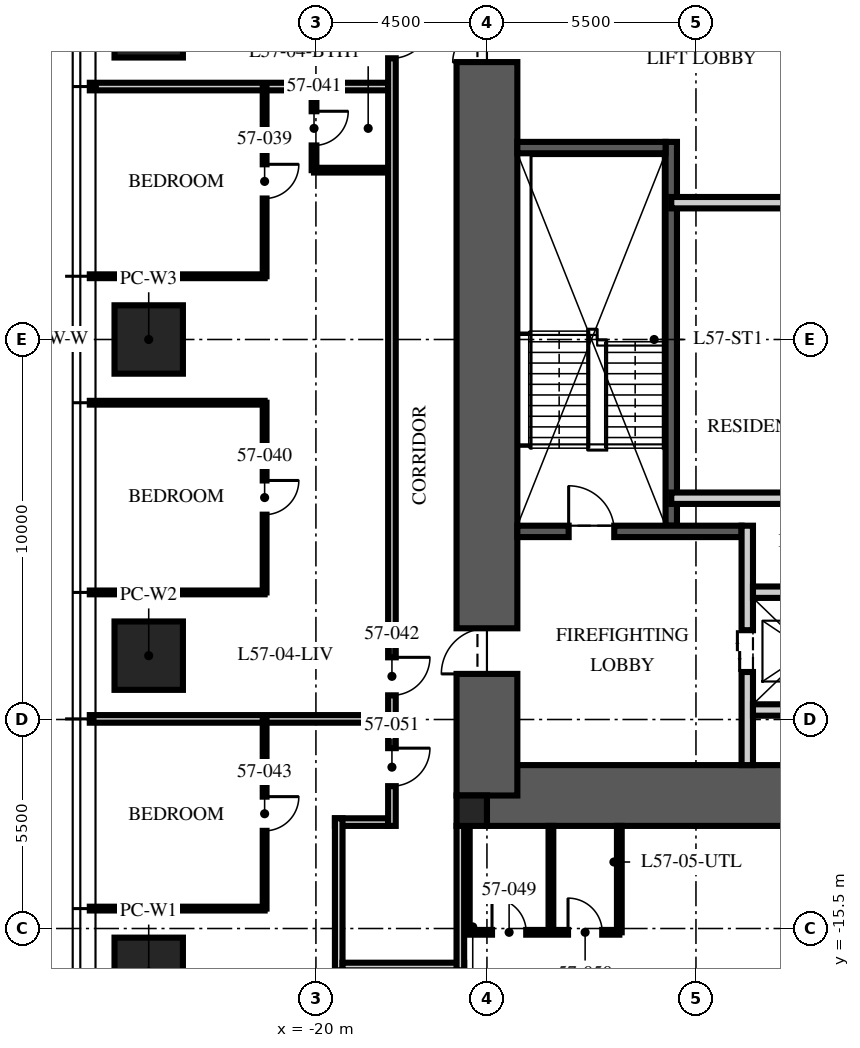
"""IFC4 building model, lengths in metres.
Left out: names, types, materials, properties, quantities, classifications, styles, units other than length and angle.
Written with IfcOpenShell. Run it as: python <this file> out.ifc"""

import sys

from ifc_helpers import new_model, si_unit, direction, frame, frame_2d, origin, origin_2d, place, context, subcontext, project, spatial, rectangle, extrude, element, fill, save


model = new_model("IFC4")
c1 = context("Model", 3, precision=1e-05, world=origin(), true_north=direction((0.0, 1.0)))
c2 = subcontext(c1, "Body", "Model", "MODEL_VIEW")
j1 = project(units=[si_unit("LENGTHUNIT", "METRE"), si_unit("PLANEANGLEUNIT", "RADIAN")], contexts=[c1])
p1 = place(None, origin())
s1 = spatial("IfcSite", under=j1, at=p1, CompositionType="ELEMENT")
p2 = place(p1, origin())
s2 = spatial("IfcBuilding", under=s1, at=p2, CompositionType="ELEMENT")
p3 = place(p2, frame((0.0, 0.0, 229.5)))
s3 = spatial("IfcBuildingStorey", under=s2, at=p3, CompositionType="ELEMENT", Elevation=229.5)
p4 = place(p3, frame((-15.5, -12.0, -0.25), z_axis=(0.0, 0.0, 1.0), x_axis=(1.0, 0.0, 0.0)))
e1 = element("IfcWall", 1, at=p4, inside=s3, PredefinedType="SHEAR", context=c2, shape_type="SweptSolid", body=[
    extrude(rectangle(XDim=31.0, YDim=1.6, at=frame_2d((15.5, 0.0))), origin(), (0.0, 0.0, 1.0), 3.75),
])
p5 = place(p3, frame((-15.5, -12.0, -0.25), z_axis=(0.0, 0.0, 1.0), x_axis=(0.0, 1.0, 0.0)))
e2 = element("IfcWall", 2, at=p5, inside=s3, PredefinedType="SHEAR", context=c2, shape_type="SweptSolid", body=[
    extrude(rectangle(XDim=24.0, YDim=1.6, at=frame_2d((12.0, 0.0))), origin(), (0.0, 0.0, 1.0), 3.75),
])
p6 = place(p5, frame((3.2, 0.0, 0.25)))
e3 = element("IfcOpeningElement", 3, at=p6, cuts=e2, PredefinedType="OPENING", context=c2, shape_type="SweptSolid", body=[
    extrude(rectangle(XDim=1.2, YDim=2.1, at=frame_2d((0.6, 1.05))), frame((0.0, 0.81, 0.0), z_axis=(0.0, -1.0, 0.0), x_axis=(1.0, 0.0, 0.0)), (0.0, 0.0, 1.0), 1.62),
])
p7 = place(p5, frame((19.3, 0.0, 0.25)))
e4 = element("IfcOpeningElement", 4, at=p7, cuts=e2, PredefinedType="OPENING", context=c2, shape_type="SweptSolid", body=[
    extrude(rectangle(XDim=1.8, YDim=2.1, at=frame_2d((0.9, 1.05))), frame((0.0, 0.81, 0.0), z_axis=(0.0, -1.0, 0.0), x_axis=(1.0, 0.0, 0.0)), (0.0, 0.0, 1.0), 1.62),
])
p8 = place(p3, frame((-15.9, -12.4, -0.25), z_axis=(0.0, 0.0, 1.0), x_axis=(1.0, 0.0, 0.0)))
e5 = element("IfcColumn", 5, at=p8, inside=s3, PredefinedType="COLUMN", context=c2, shape_type="SweptSolid", body=[
    extrude(rectangle(XDim=0.8, YDim=0.8, at=origin_2d()), origin(), (0.0, 0.0, 1.0), 3.75),
])
for number, where, z_axis, x_axis in (
    (6, (-24.4, -16.64, 0.0), (0.0, 0.0, 1.0), (0.0, 1.0, 0.0)),
    (7, (-24.4, -8.32, 0.0), (0.0, 0.0, 1.0), (0.0, 1.0, 0.0)),
    (8, (-24.4, 0.0, 0.0), (0.0, 0.0, 1.0), (0.0, 1.0, 0.0)),
    (9, (-24.4, 8.32, 0.0), (0.0, 0.0, 1.0), (0.0, 1.0, 0.0)),
):
    element("IfcColumn", number, at=place(p3, frame(where, z_axis=z_axis, x_axis=x_axis)), inside=s3, PredefinedType="COLUMN", context=c2, shape_type="SweptSolid", body=[
        extrude(rectangle(XDim=1.8, YDim=1.8, at=origin_2d()), origin(), (0.0, 0.0, 1.0), 3.75),
    ])
p9 = place(p3, frame((-10.65, -4.9, 0.0), z_axis=(0.0, 0.0, 1.0), x_axis=(0.0, 1.0, 0.0)))
e10 = element("IfcWall", 10, at=p9, inside=s3, PredefinedType="SOLIDWALL", context=c2, shape_type="SweptSolid", body=[
    extrude(rectangle(XDim=10.1, YDim=0.3, at=frame_2d((5.05, 0.0))), origin(), (0.0, 0.0, 1.0), 3.5),
])
p10 = place(p3, frame((-14.7, -5.05, 0.0), z_axis=(0.0, 0.0, 1.0), x_axis=(1.0, 0.0, 0.0)))
e11 = element("IfcWall", 11, at=p10, inside=s3, PredefinedType="SOLIDWALL", context=c2, shape_type="SweptSolid", body=[
    extrude(rectangle(XDim=5.9, YDim=0.3, at=frame_2d((2.95, 0.0))), origin(), (0.0, 0.0, 1.0), 3.5),
])
p11 = place(p10, frame((1.35, 0.0, 0.0)))
e12 = element("IfcOpeningElement", 12, at=p11, cuts=e11, PredefinedType="OPENING", context=c2, shape_type="SweptSolid", body=[
    extrude(rectangle(XDim=1.2, YDim=2.1, at=frame_2d((0.6, 1.05))), frame((0.0, 0.16, 0.0), z_axis=(0.0, -1.0, 0.0), x_axis=(1.0, 0.0, 0.0)), (0.0, 0.0, 1.0), 0.32),
])
p12 = place(p3, frame((-14.7, 5.05, 0.0), z_axis=(0.0, 0.0, 1.0), x_axis=(1.0, 0.0, 0.0)))
e13 = element("IfcWall", 13, at=p12, inside=s3, PredefinedType="SOLIDWALL", context=c2, shape_type="SweptSolid", body=[
    extrude(rectangle(XDim=3.9, YDim=0.3, at=frame_2d((1.95, 0.0))), origin(), (0.0, 0.0, 1.0), 3.5),
])
p13 = place(p3, frame((-8.65, -11.2, 0.0), z_axis=(0.0, 0.0, 1.0), x_axis=(0.0, 1.0, 0.0)))
e14 = element("IfcWall", 14, at=p13, inside=s3, PredefinedType="PARTITIONING", context=c2, shape_type="SweptSolid", body=[
    extrude(rectangle(XDim=6.3, YDim=0.3, at=frame_2d((3.15, 0.0))), origin(), (0.0, 0.0, 1.0), 3.5),
])
p14 = place(p13, frame((2.45, 0.0, 0.0)))
e15 = element("IfcOpeningElement", 15, at=p14, cuts=e14, PredefinedType="OPENING", context=c2, shape_type="SweptSolid", body=[
    extrude(rectangle(XDim=1.1, YDim=2.1, at=frame_2d((0.55, 1.05))), frame((0.0, 0.16, 0.0), z_axis=(0.0, -1.0, 0.0), x_axis=(1.0, 0.0, 0.0)), (0.0, 0.0, 1.0), 0.32),
])
p15 = place(p3, frame((-8.5, -6.65, 0.0), z_axis=(0.0, 0.0, 1.0), x_axis=(1.0, 0.0, 0.0)))
e16 = element("IfcWall", 16, at=p15, inside=s3, PredefinedType="PARTITIONING", context=c2, shape_type="SweptSolid", body=[
    extrude(rectangle(XDim=17.0, YDim=0.3, at=frame_2d((8.5, 0.0))), origin(), (0.0, 0.0, 1.0), 3.5),
])
p16 = place(p15, frame((7.8, 0.0, 0.0)))
e17 = element("IfcOpeningElement", 17, at=p16, cuts=e16, PredefinedType="OPENING", context=c2, shape_type="SweptSolid", body=[
    extrude(rectangle(XDim=1.3, YDim=2.4, at=frame_2d((0.65, 1.2))), frame((0.0, 0.16, 0.0), z_axis=(0.0, -1.0, 0.0), x_axis=(1.0, 0.0, 0.0)), (0.0, 0.0, 1.0), 0.32),
])
p17 = place(p15, frame((5.65, 0.0, 0.0)))
e18 = element("IfcOpeningElement", 18, at=p17, cuts=e16, PredefinedType="OPENING", context=c2, shape_type="SweptSolid", body=[
    extrude(rectangle(XDim=0.9, YDim=2.1, at=frame_2d((0.45, 1.05))), frame((0.0, 0.16, 0.0), z_axis=(0.0, -1.0, 0.0), x_axis=(1.0, 0.0, 0.0)), (0.0, 0.0, 1.0), 0.32),
])
p18 = place(p15, frame((10.4, 0.0, 0.0)))
e19 = element("IfcOpeningElement", 19, at=p18, cuts=e16, PredefinedType="OPENING", context=c2, shape_type="SweptSolid", body=[
    extrude(rectangle(XDim=0.9, YDim=2.1, at=frame_2d((0.45, 1.05))), frame((0.0, 0.16, 0.0), z_axis=(0.0, -1.0, 0.0), x_axis=(1.0, 0.0, 0.0)), (0.0, 0.0, 1.0), 0.32),
])
p19 = place(p3, frame((-8.5, -9.75, 0.0), z_axis=(0.0, 0.0, 1.0), x_axis=(1.0, 0.0, 0.0)))
e20 = element("IfcWall", 20, at=p19, inside=s3, PredefinedType="PARTITIONING", context=c2, shape_type="SweptSolid", body=[
    extrude(rectangle(XDim=2.9, YDim=0.3, at=frame_2d((1.45, 0.0))), origin(), (0.0, 0.0, 1.0), 3.5),
])
p20 = place(p3, frame((-10.65, 3.6, 0.0), z_axis=(0.0, 0.0, 1.0), x_axis=(1.0, 0.0, 0.0)))
e21 = element("IfcWall", 21, at=p20, inside=s3, PredefinedType="PARTITIONING", context=c2, shape_type="SweptSolid", body=[
    extrude(rectangle(XDim=21.3, YDim=0.3, at=frame_2d((10.65, 0.0))), origin(), (0.0, 0.0, 1.0), 3.5),
])
p21 = place(p20, frame((10.05, 0.0, 0.0)))
e22 = element("IfcOpeningElement", 22, at=p21, cuts=e21, PredefinedType="OPENING", context=c2, shape_type="SweptSolid", body=[
    extrude(rectangle(XDim=1.2, YDim=2.1, at=frame_2d((0.6, 1.05))), frame((0.0, 0.16, 0.0), z_axis=(0.0, -1.0, 0.0), x_axis=(1.0, 0.0, 0.0)), (0.0, 0.0, 1.0), 0.32),
])
p22 = place(p20, frame((19.238, 0.0, 0.0)))
e23 = element("IfcOpeningElement", 23, at=p22, cuts=e21, PredefinedType="OPENING", context=c2, shape_type="SweptSolid", body=[
    extrude(rectangle(XDim=0.9, YDim=2.1, at=frame_2d((0.45, 1.05))), frame((0.0, 0.16, 0.0), z_axis=(0.0, -1.0, 0.0), x_axis=(1.0, 0.0, 0.0)), (0.0, 0.0, 1.0), 0.32),
])
p23 = place(p3, frame((-10.65, -4.177, 0.0), z_axis=(0.0, 0.0, 1.0), x_axis=(1.0, 0.0, 0.0)))
e24 = element("IfcWall", 24, at=p23, inside=s3, PredefinedType="PARTITIONING", context=c2, shape_type="SweptSolid", body=[
    extrude(rectangle(XDim=6.45, YDim=0.3, at=frame_2d((3.225, 0.0))), origin(), (0.0, 0.0, 1.0), 3.5),
])
p24 = place(p3, frame((-18.1, -12.7, 0.0), z_axis=(0.0, 0.0, 1.0), x_axis=(-1.0, 0.0, 0.0)))
e25 = element("IfcWall", 25, at=p24, inside=s3, PredefinedType="PARTITIONING", context=c2, shape_type="SweptSolid", body=[
    extrude(rectangle(XDim=1.4, YDim=0.2, at=frame_2d((0.7, 0.0))), origin(), (0.0, 0.0, 1.0), 2.81),
])
p25 = place(p3, frame((-19.4, -12.6, 0.0), z_axis=(0.0, 0.0, 1.0), x_axis=(0.0, -1.0, 0.0)))
e26 = element("IfcWall", 26, at=p25, inside=s3, PredefinedType="PARTITIONING", context=c2, shape_type="SweptSolid", body=[
    extrude(rectangle(XDim=4.0, YDim=0.2, at=frame_2d((2.0, 0.0))), origin(), (0.0, 0.0, 1.0), 2.6),
])
p26 = place(p3, frame((-19.3, -16.5, 0.0), z_axis=(0.0, 0.0, 1.0), x_axis=(1.0, 0.0, 0.0)))
e27 = element("IfcWall", 27, at=p26, inside=s3, PredefinedType="PARTITIONING", context=c2, shape_type="SweptSolid", body=[
    extrude(rectangle(XDim=3.2, YDim=0.2, at=frame_2d((1.6, 0.0))), origin(), (0.0, 0.0, 1.0), 2.3),
])
p27 = place(p3, frame((-16.2, -16.6, 0.0), z_axis=(0.0, 0.0, 1.0), x_axis=(0.0, 1.0, 0.0)))
e28 = element("IfcWall", 28, at=p27, inside=s3, PredefinedType="PARTITIONING", context=c2, shape_type="SweptSolid", body=[
    extrude(rectangle(XDim=3.8, YDim=0.2, at=frame_2d((1.9, 0.0))), origin(), (0.0, 0.0, 1.0), 2.3),
])
p28 = place(p3, frame((-18.1, 6.656, 0.0), z_axis=(0.0, 0.0, 1.0), x_axis=(-1.0, 0.0, 0.0)))
e29 = element("IfcWall", 29, at=p28, inside=s3, PredefinedType="PARTITIONING", context=c2, shape_type="SweptSolid", body=[
    extrude(rectangle(XDim=7.85, YDim=0.2, at=frame_2d((3.925, 0.0))), origin(), (0.0, 0.0, 1.0), 2.91),
])
for number, where, z_axis, x_axis in (
    (30, (-21.35, 1.664, 0.0), (0.0, 0.0, 1.0), (-1.0, 0.0, 0.0)),
    (31, (-21.35, -1.664, 0.0), (0.0, 0.0, 1.0), (-1.0, 0.0, 0.0)),
    (32, (-21.35, -6.656, 0.0), (0.0, 0.0, 1.0), (-1.0, 0.0, 0.0)),
):
    element("IfcWall", number, at=place(p3, frame(where, z_axis=z_axis, x_axis=x_axis)), inside=s3, PredefinedType="PARTITIONING", context=c2, shape_type="SweptSolid", body=[
        extrude(rectangle(XDim=4.6, YDim=0.1, at=frame_2d((2.3, 0.0))), origin(), (0.0, 0.0, 1.0), 2.91),
    ])
p29 = place(p3, frame((-18.1, -9.984, 0.0), z_axis=(0.0, 0.0, 1.0), x_axis=(-1.0, 0.0, 0.0)))
e33 = element("IfcWall", 33, at=p29, inside=s3, PredefinedType="PARTITIONING", context=c2, shape_type="SweptSolid", body=[
    extrude(rectangle(XDim=7.85, YDim=0.2, at=frame_2d((3.925, 0.0))), origin(), (0.0, 0.0, 1.0), 2.91),
])
p30 = place(p3, frame((-21.35, -14.976, 0.0), z_axis=(0.0, 0.0, 1.0), x_axis=(-1.0, 0.0, 0.0)))
e34 = element("IfcWall", 34, at=p30, inside=s3, PredefinedType="PARTITIONING", context=c2, shape_type="SweptSolid", body=[
    extrude(rectangle(XDim=4.6, YDim=0.1, at=frame_2d((2.3, 0.0))), origin(), (0.0, 0.0, 1.0), 2.91),
])
p31 = place(p3, frame((-21.35, 6.656, 0.0), z_axis=(0.0, 0.0, 1.0), x_axis=(0.0, -1.0, 0.0)))
e35 = element("IfcWall", 35, at=p31, inside=s3, PredefinedType="PARTITIONING", context=c2, shape_type="SweptSolid", body=[
    extrude(rectangle(XDim=4.992, YDim=0.1, at=frame_2d((2.496, 0.0))), origin(), (0.0, 0.0, 1.0), 2.81),
])
p32 = place(p31, frame((2.046, 0.0, 0.0)))
e36 = element("IfcOpeningElement", 36, at=p32, cuts=e35, PredefinedType="OPENING", context=c2, shape_type="SweptSolid", body=[
    extrude(rectangle(XDim=0.9, YDim=2.1, at=frame_2d((0.45, 1.05))), frame((0.0, 0.06, 0.0), z_axis=(0.0, -1.0, 0.0), x_axis=(1.0, 0.0, 0.0)), (0.0, 0.0, 1.0), 0.12),
])
p33 = place(p3, frame((-21.35, -1.664, 0.0), z_axis=(0.0, 0.0, 1.0), x_axis=(0.0, -1.0, 0.0)))
e37 = element("IfcWall", 37, at=p33, inside=s3, PredefinedType="PARTITIONING", context=c2, shape_type="SweptSolid", body=[
    extrude(rectangle(XDim=4.992, YDim=0.1, at=frame_2d((2.496, 0.0))), origin(), (0.0, 0.0, 1.0), 2.81),
])
p34 = place(p33, frame((2.046, 0.0, 0.0)))
e38 = element("IfcOpeningElement", 38, at=p34, cuts=e37, PredefinedType="OPENING", context=c2, shape_type="SweptSolid", body=[
    extrude(rectangle(XDim=0.9, YDim=2.1, at=frame_2d((0.45, 1.05))), frame((0.0, 0.06, 0.0), z_axis=(0.0, -1.0, 0.0), x_axis=(1.0, 0.0, 0.0)), (0.0, 0.0, 1.0), 0.12),
])
p35 = place(p3, frame((-20.05, 6.656, 0.0), z_axis=(0.0, 0.0, 1.0), x_axis=(0.0, -1.0, 0.0)))
e39 = element("IfcWall", 39, at=p35, inside=s3, PredefinedType="PARTITIONING", context=c2, shape_type="SweptSolid", body=[
    extrude(rectangle(XDim=2.2, YDim=0.125, at=frame_2d((1.1, 0.0))), origin(), (0.0, 0.0, 1.0), 3.5),
])
p36 = place(p35, frame((0.65, 0.0, 0.0)))
e40 = element("IfcOpeningElement", 40, at=p36, cuts=e39, PredefinedType="OPENING", context=c2, shape_type="SweptSolid", body=[
    extrude(rectangle(XDim=0.9, YDim=2.1, at=frame_2d((0.45, 1.05))), frame((0.0, 0.073, 0.0), z_axis=(0.0, -1.0, 0.0), x_axis=(1.0, 0.0, 0.0)), (0.0, 0.0, 1.0), 0.145),
])
p37 = place(p3, frame((-18.1, 4.456, 0.0), z_axis=(0.0, 0.0, 1.0), x_axis=(-1.0, 0.0, 0.0)))
e41 = element("IfcWall", 41, at=p37, inside=s3, PredefinedType="PARTITIONING", context=c2, shape_type="SweptSolid", body=[
    extrude(rectangle(XDim=1.95, YDim=0.125, at=frame_2d((0.975, 0.0))), origin(), (0.0, 0.0, 1.0), 3.5),
])
p38 = place(p3, frame((-21.35, -9.984, 0.0), z_axis=(0.0, 0.0, 1.0), x_axis=(0.0, -1.0, 0.0)))
e42 = element("IfcWall", 42, at=p38, inside=s3, PredefinedType="PARTITIONING", context=c2, shape_type="SweptSolid", body=[
    extrude(rectangle(XDim=4.992, YDim=0.1, at=frame_2d((2.496, 0.0))), origin(), (0.0, 0.0, 1.0), 2.81),
])
p39 = place(p38, frame((2.046, 0.0, 0.0)))
e43 = element("IfcOpeningElement", 43, at=p39, cuts=e42, PredefinedType="OPENING", context=c2, shape_type="SweptSolid", body=[
    extrude(rectangle(XDim=0.9, YDim=2.1, at=frame_2d((0.45, 1.05))), frame((0.0, 0.06, 0.0), z_axis=(0.0, -1.0, 0.0), x_axis=(1.0, 0.0, 0.0)), (0.0, 0.0, 1.0), 0.12),
])
p40 = place(p3, frame((-16.017, -15.6, 0.0), z_axis=(0.0, 0.0, 1.0), x_axis=(1.0, 0.0, 0.0)))
e44 = element("IfcWall", 44, at=p40, inside=s3, PredefinedType="PARTITIONING", context=c2, shape_type="SweptSolid", body=[
    extrude(rectangle(XDim=4.0, YDim=0.125, at=frame_2d((2.0, 0.0))), origin(), (0.0, 0.0, 1.0), 2.81),
])
p41 = place(p40, frame((0.65, 0.0, 0.0)))
e45 = element("IfcOpeningElement", 45, at=p41, cuts=e44, PredefinedType="OPENING", context=c2, shape_type="SweptSolid", body=[
    extrude(rectangle(XDim=0.9, YDim=2.1, at=frame_2d((0.45, 1.05))), frame((0.0, 0.073, 0.0), z_axis=(0.0, -1.0, 0.0), x_axis=(1.0, 0.0, 0.0)), (0.0, 0.0, 1.0), 0.145),
])
p42 = place(p40, frame((2.65, 0.0, 0.0)))
e46 = element("IfcOpeningElement", 46, at=p42, cuts=e44, PredefinedType="OPENING", context=c2, shape_type="SweptSolid", body=[
    extrude(rectangle(XDim=0.9, YDim=2.1, at=frame_2d((0.45, 1.05))), frame((0.0, 0.073, 0.0), z_axis=(0.0, -1.0, 0.0), x_axis=(1.0, 0.0, 0.0)), (0.0, 0.0, 1.0), 0.145),
])
p43 = place(p3, frame((-16.017, -12.8, 0.0), z_axis=(0.0, 0.0, 1.0), x_axis=(0.0, -1.0, 0.0)))
e47 = element("IfcWall", 47, at=p43, inside=s3, PredefinedType="PARTITIONING", context=c2, shape_type="SweptSolid", body=[
    extrude(rectangle(XDim=2.8, YDim=0.125, at=frame_2d((1.4, 0.0))), origin(), (0.0, 0.0, 1.0), 2.3),
])
for number, where, z_axis, x_axis in (
    (48, (-13.816, -12.8, 0.0), (0.0, 0.0, 1.0), (0.0, -1.0, 0.0)),
    (49, (-12.017, -12.8, 0.0), (0.0, 0.0, 1.0), (0.0, -1.0, 0.0)),
):
    element("IfcWall", number, at=place(p3, frame(where, z_axis=z_axis, x_axis=x_axis)), inside=s3, PredefinedType="PARTITIONING", context=c2, shape_type="SweptSolid", body=[
        extrude(rectangle(XDim=2.8, YDim=0.125, at=frame_2d((1.4, 0.0))), origin(), (0.0, 0.0, 1.0), 3.5),
    ])
p44 = place(p3, frame((-18.0, 13.0, 0.0), z_axis=(0.0, 0.0, 1.0), x_axis=(0.0, -1.0, 0.0)))
e50 = element("IfcWall", 50, at=p44, inside=s3, PredefinedType="PARTITIONING", context=c2, shape_type="SweptSolid", body=[
    extrude(rectangle(XDim=25.8, YDim=0.2, at=frame_2d((12.9, 0.0))), origin(), (0.0, 0.0, 1.0), 2.6),
])
p45 = place(p44, frame((4.6, 0.0, 0.0)))
e51 = element("IfcOpeningElement", 51, at=p45, cuts=e50, PredefinedType="OPENING", context=c2, shape_type="SweptSolid", body=[
    extrude(rectangle(XDim=1.0, YDim=2.2, at=frame_2d((0.5, 1.1))), frame((0.0, 0.11, 0.0), z_axis=(0.0, -1.0, 0.0), x_axis=(1.0, 0.0, 0.0)), (0.0, 0.0, 1.0), 0.22),
])
p46 = place(p44, frame((21.364, 0.0, 0.0)))
e52 = element("IfcOpeningElement", 52, at=p46, cuts=e50, PredefinedType="OPENING", context=c2, shape_type="SweptSolid", body=[
    extrude(rectangle(XDim=1.0, YDim=2.2, at=frame_2d((0.5, 1.1))), frame((0.0, 0.11, 0.0), z_axis=(0.0, -1.0, 0.0), x_axis=(1.0, 0.0, 0.0)), (0.0, 0.0, 1.0), 0.22),
])
p47 = place(p44, frame((23.754, 0.0, 0.0)))
e53 = element("IfcOpeningElement", 53, at=p47, cuts=e50, PredefinedType="OPENING", context=c2, shape_type="SweptSolid", body=[
    extrude(rectangle(XDim=1.0, YDim=2.2, at=frame_2d((0.5, 1.1))), frame((0.0, 0.11, 0.0), z_axis=(0.0, -1.0, 0.0), x_axis=(1.0, 0.0, 0.0)), (0.0, 0.0, 1.0), 0.22),
])
p48 = place(p11, origin())
e54 = element("IfcDoor", 54, at=p48, inside=s3, OperationType="SINGLE_SWING_LEFT", PredefinedType="DOOR", context=c2, shape_type="SweptSolid", body=[
    extrude(rectangle(XDim=1.2, YDim=2.1, at=frame_2d((0.6, 1.05))), frame((0.0, 0.025, 0.0), z_axis=(0.0, -1.0, 0.0), x_axis=(1.0, 0.0, 0.0)), (0.0, 0.0, 1.0), 0.05),
])
fill(e12, e54)
p49 = place(p6, origin())
e55 = element("IfcDoor", 55, at=p49, inside=s3, OperationType="SINGLE_SWING_LEFT", PredefinedType="DOOR", context=c2, shape_type="SweptSolid", body=[
    extrude(rectangle(XDim=1.2, YDim=2.1, at=frame_2d((0.6, 1.05))), frame((0.0, 0.025, 0.0), z_axis=(0.0, -1.0, 0.0), x_axis=(1.0, 0.0, 0.0)), (0.0, 0.0, 1.0), 0.05),
])
fill(e3, e55)
p50 = place(p7, origin())
e56 = element("IfcDoor", 56, at=p50, inside=s3, OperationType="DOUBLE_DOOR_SINGLE_SWING", PredefinedType="DOOR", context=c2, shape_type="SweptSolid", body=[
    extrude(rectangle(XDim=1.8, YDim=2.1, at=frame_2d((0.9, 1.05))), frame((0.0, 0.025, 0.0), z_axis=(0.0, -1.0, 0.0), x_axis=(1.0, 0.0, 0.0)), (0.0, 0.0, 1.0), 0.05),
])
fill(e4, e56)
p51 = place(p14, origin())
e57 = element("IfcDoor", 57, at=p51, inside=s3, OperationType="DOUBLE_DOOR_SLIDING", PredefinedType="DOOR", context=c2, shape_type="SweptSolid", body=[
    extrude(rectangle(XDim=1.1, YDim=2.1, at=frame_2d((0.55, 1.05))), frame((0.0, 0.025, 0.0), z_axis=(0.0, -1.0, 0.0), x_axis=(1.0, 0.0, 0.0)), (0.0, 0.0, 1.0), 0.05),
])
fill(e15, e57)
p52 = place(p45, origin())
e58 = element("IfcDoor", 58, at=p52, inside=s3, OperationType="SINGLE_SWING_LEFT", PredefinedType="DOOR", context=c2, shape_type="SweptSolid", body=[
    extrude(rectangle(XDim=1.0, YDim=2.2, at=frame_2d((0.5, 1.1))), frame((0.0, 0.025, 0.0), z_axis=(0.0, -1.0, 0.0), x_axis=(1.0, 0.0, 0.0)), (0.0, 0.0, 1.0), 0.05),
])
fill(e51, e58)
p53 = place(p32, origin())
e59 = element("IfcDoor", 59, at=p53, inside=s3, OperationType="SINGLE_SWING_LEFT", PredefinedType="DOOR", context=c2, shape_type="SweptSolid", body=[
    extrude(rectangle(XDim=0.9, YDim=2.1, at=frame_2d((0.45, 1.05))), frame((0.0, 0.025, 0.0), z_axis=(0.0, -1.0, 0.0), x_axis=(1.0, 0.0, 0.0)), (0.0, 0.0, 1.0), 0.05),
])
fill(e36, e59)
p54 = place(p34, origin())
e60 = element("IfcDoor", 60, at=p54, inside=s3, OperationType="SINGLE_SWING_LEFT", PredefinedType="DOOR", context=c2, shape_type="SweptSolid", body=[
    extrude(rectangle(XDim=0.9, YDim=2.1, at=frame_2d((0.45, 1.05))), frame((0.0, 0.025, 0.0), z_axis=(0.0, -1.0, 0.0), x_axis=(1.0, 0.0, 0.0)), (0.0, 0.0, 1.0), 0.05),
])
fill(e38, e60)
p55 = place(p36, origin())
e61 = element("IfcDoor", 61, at=p55, inside=s3, OperationType="SINGLE_SWING_LEFT", PredefinedType="DOOR", context=c2, shape_type="SweptSolid", body=[
    extrude(rectangle(XDim=0.9, YDim=2.1, at=frame_2d((0.45, 1.05))), frame((0.0, 0.025, 0.0), z_axis=(0.0, -1.0, 0.0), x_axis=(1.0, 0.0, 0.0)), (0.0, 0.0, 1.0), 0.05),
])
fill(e40, e61)
p56 = place(p46, origin())
e62 = element("IfcDoor", 62, at=p56, inside=s3, OperationType="SINGLE_SWING_LEFT", PredefinedType="DOOR", context=c2, shape_type="SweptSolid", body=[
    extrude(rectangle(XDim=1.0, YDim=2.2, at=frame_2d((0.5, 1.1))), frame((0.0, 0.025, 0.0), z_axis=(0.0, -1.0, 0.0), x_axis=(1.0, 0.0, 0.0)), (0.0, 0.0, 1.0), 0.05),
])
fill(e52, e62)
p57 = place(p39, origin())
e63 = element("IfcDoor", 63, at=p57, inside=s3, OperationType="SINGLE_SWING_LEFT", PredefinedType="DOOR", context=c2, shape_type="SweptSolid", body=[
    extrude(rectangle(XDim=0.9, YDim=2.1, at=frame_2d((0.45, 1.05))), frame((0.0, 0.025, 0.0), z_axis=(0.0, -1.0, 0.0), x_axis=(1.0, 0.0, 0.0)), (0.0, 0.0, 1.0), 0.05),
])
fill(e43, e63)
p58 = place(p41, origin())
e64 = element("IfcDoor", 64, at=p58, inside=s3, OperationType="SINGLE_SWING_LEFT", PredefinedType="DOOR", context=c2, shape_type="SweptSolid", body=[
    extrude(rectangle(XDim=0.9, YDim=2.1, at=frame_2d((0.45, 1.05))), frame((0.0, 0.025, 0.0), z_axis=(0.0, -1.0, 0.0), x_axis=(1.0, 0.0, 0.0)), (0.0, 0.0, 1.0), 0.05),
])
fill(e45, e64)
p59 = place(p42, origin())
e65 = element("IfcDoor", 65, at=p59, inside=s3, OperationType="SINGLE_SWING_LEFT", PredefinedType="DOOR", context=c2, shape_type="SweptSolid", body=[
    extrude(rectangle(XDim=0.9, YDim=2.1, at=frame_2d((0.45, 1.05))), frame((0.0, 0.025, 0.0), z_axis=(0.0, -1.0, 0.0), x_axis=(1.0, 0.0, 0.0)), (0.0, 0.0, 1.0), 0.05),
])
fill(e46, e65)
p60 = place(p47, origin())
e66 = element("IfcDoor", 66, at=p60, inside=s3, OperationType="SINGLE_SWING_LEFT", PredefinedType="DOOR", context=c2, shape_type="SweptSolid", body=[
    extrude(rectangle(XDim=1.0, YDim=2.2, at=frame_2d((0.5, 1.1))), frame((0.0, 0.025, 0.0), z_axis=(0.0, -1.0, 0.0), x_axis=(1.0, 0.0, 0.0)), (0.0, 0.0, 1.0), 0.05),
])
fill(e53, e66)
save(model, sys.argv[1])
